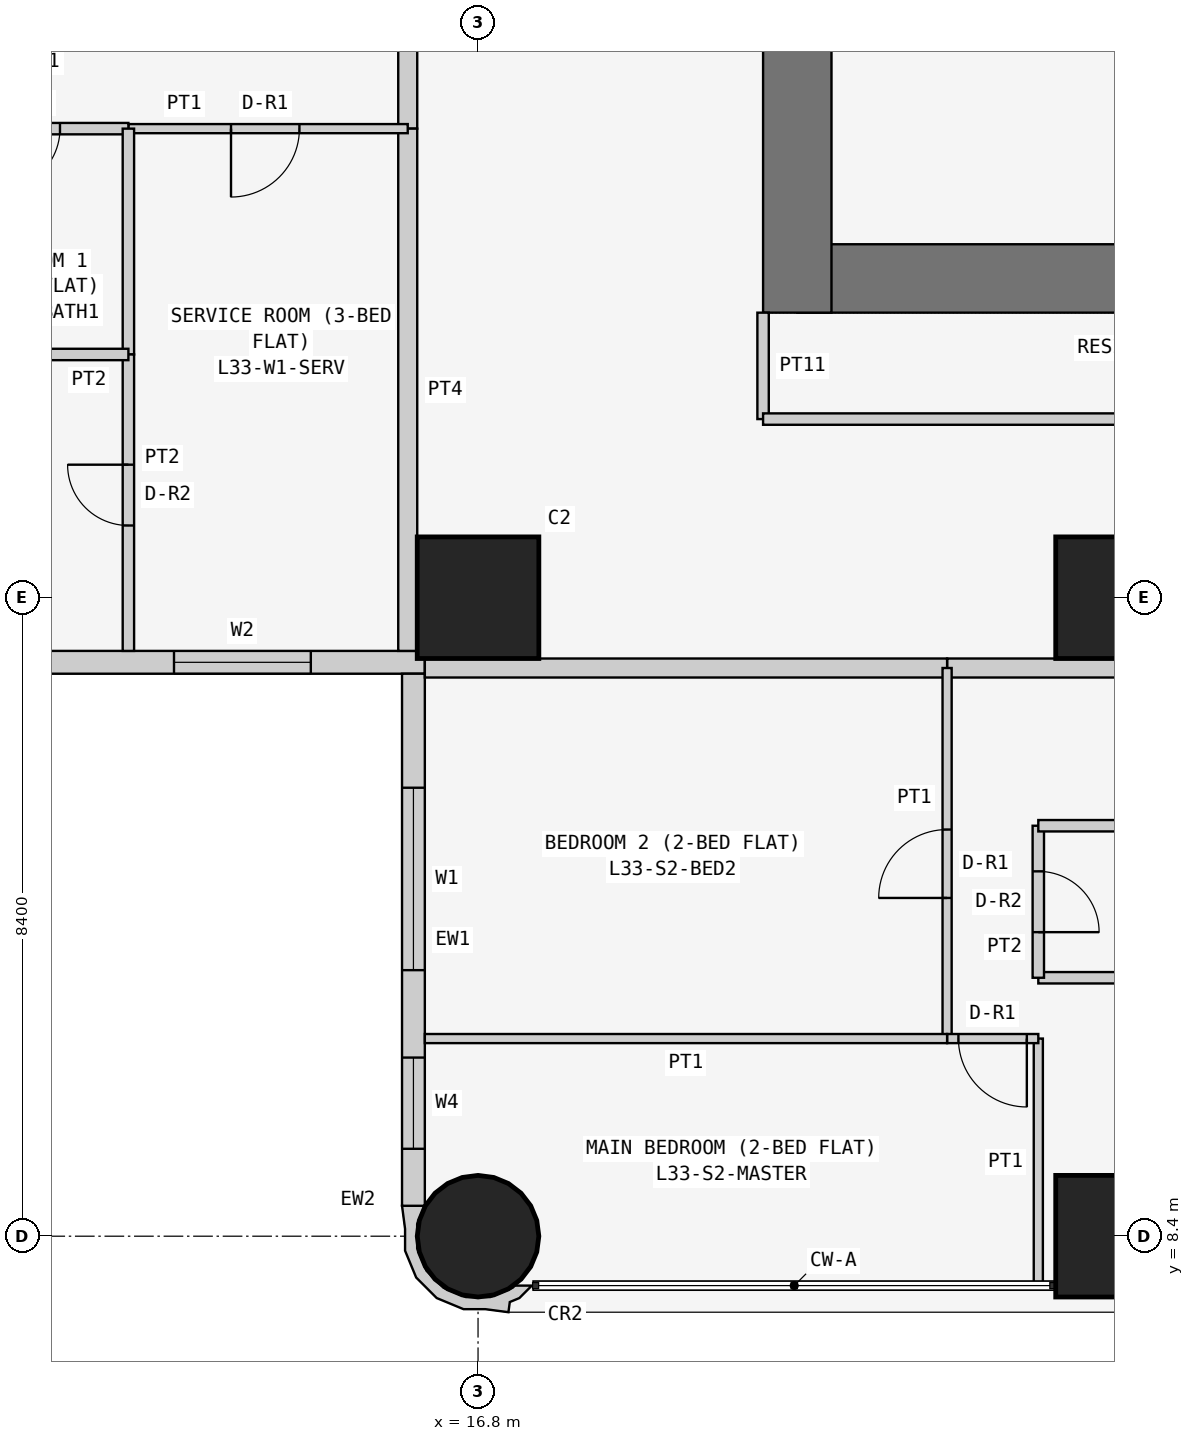
"""IFC4 building model, lengths in metres.
Left out: names, types, materials, properties, quantities, classifications, styles, units other than length and angle.
Written with IfcOpenShell. Run it as: python <this file> out.ifc"""

import sys

from ifc_helpers import new_model, si_unit, direction, frame, frame_2d, origin, origin_2d, place, context, subcontext, project, spatial, polyline, rectangle, circle, outline, extrude, element, fill, save


model = new_model("IFC4")
c1 = context("Model", 3, precision=1e-05, world=origin(), true_north=direction((0.0, 1.0)))
c2 = subcontext(c1, "Body", "Model", "MODEL_VIEW")
j1 = project(units=[si_unit("LENGTHUNIT", "METRE"), si_unit("PLANEANGLEUNIT", "RADIAN")], contexts=[c1])
p1 = place(None, origin())
s1 = spatial("IfcSite", under=j1, at=p1, CompositionType="ELEMENT")
p2 = place(p1, origin())
s2 = spatial("IfcBuilding", under=s1, at=p2, CompositionType="ELEMENT")
p3 = place(p2, frame((0.0, 0.0, 130.5)))
s3 = spatial("IfcBuildingStorey", under=s2, at=p3, CompositionType="ELEMENT", Elevation=130.5)
p4 = place(p3, frame((16.8, 8.4, 0.0), z_axis=(0.0, 0.0, 1.0), x_axis=(1.0, 0.0, 0.0)))
e1 = element("IfcColumn", 1, at=p4, inside=s3, PredefinedType="COLUMN", context=c2, shape_type="SweptSolid", body=[
    extrude(circle(Radius=0.8, at=origin_2d()), origin(), (0.0, 0.0, 1.0), 3.6),
])
for number, where, z_axis, x_axis in (
    (2, (16.8, 16.8, 0.0), (0.0, 0.0, 1.0), (1.0, 0.0, 0.0)),
    (3, (25.2, 8.4, 0.0), (0.0, 0.0, 1.0), (1.0, 0.0, 0.0)),
    (4, (25.2, 16.8, 0.0), (0.0, 0.0, 1.0), (1.0, 0.0, 0.0)),
):
    element("IfcColumn", number, at=place(p3, frame(where, z_axis=z_axis, x_axis=x_axis)), inside=s3, PredefinedType="COLUMN", context=c2, shape_type="SweptSolid", body=[
        extrude(rectangle(XDim=1.6, YDim=1.6, at=origin_2d()), origin(), (0.0, 0.0, 1.0), 3.6),
    ])
p5 = place(p3, frame((21.0, 21.0, 0.0), z_axis=(0.0, 0.0, 1.0), x_axis=(1.0, 0.0, 0.0)))
e5 = element("IfcWall", 5, at=p5, inside=s3, PredefinedType="SHEAR", context=c2, shape_type="SweptSolid", body=[
    extrude(rectangle(XDim=17.25, YDim=0.9, at=frame_2d((8.625, 0.0))), origin(), (0.0, 0.0, 1.0), 3.6),
])
p6 = place(p3, frame((21.0, 37.8, 0.0), z_axis=(0.0, 0.0, 1.0), x_axis=(0.0, -1.0, 0.0)))
e6 = element("IfcWall", 6, at=p6, inside=s3, PredefinedType="SHEAR", context=c2, shape_type="SweptSolid", body=[
    extrude(rectangle(XDim=17.25, YDim=0.9, at=frame_2d((8.625, 0.0))), origin(), (0.0, 0.0, 1.0), 3.6),
])
p7 = place(p6, frame((5.4, 0.0, 0.0)))
e7 = element("IfcOpeningElement", 7, at=p7, cuts=e6, PredefinedType="OPENING", context=c2, shape_type="SweptSolid", body=[
    extrude(rectangle(XDim=1.2, YDim=2.1, at=frame_2d((0.6, 1.05))), frame((0.0, 0.46, 0.0), z_axis=(0.0, -1.0, 0.0), x_axis=(1.0, 0.0, 0.0)), (0.0, 0.0, 1.0), 0.92),
])
p8 = place(p3, frame((0.4, 15.95, 0.0), z_axis=(0.0, 0.0, 1.0), x_axis=(1.0, 0.0, 0.0)))
e8 = element("IfcWall", 8, at=p8, inside=s3, PredefinedType="SOLIDWALL", context=c2, shape_type="SweptSolid", body=[
    extrude(rectangle(XDim=15.7, YDim=0.3, at=frame_2d((7.85, 0.0))), origin(), (0.0, 0.0, 1.0), 3.45),
])
p9 = place(p8, frame((12.4, 0.0, 0.9)))
e9 = element("IfcOpeningElement", 9, at=p9, cuts=e8, PredefinedType="OPENING", context=c2, shape_type="SweptSolid", body=[
    extrude(rectangle(XDim=1.8, YDim=1.5, at=frame_2d((0.9, 0.75))), frame((0.0, 0.16, 0.0), z_axis=(0.0, -1.0, 0.0), x_axis=(1.0, 0.0, 0.0)), (0.0, 0.0, 1.0), 0.32),
])
p10 = place(p8, frame((9.55, 0.0, 1.5)))
e10 = element("IfcOpeningElement", 10, at=p10, cuts=e8, PredefinedType="OPENING", context=c2, shape_type="SweptSolid", body=[
    extrude(rectangle(XDim=0.9, YDim=0.7, at=frame_2d((0.45, 0.35))), frame((0.0, 0.16, 0.0), z_axis=(0.0, -1.0, 0.0), x_axis=(1.0, 0.0, 0.0)), (0.0, 0.0, 1.0), 0.32),
])
p11 = place(p8, frame((5.1, 0.0, 0.9)))
e11 = element("IfcOpeningElement", 11, at=p11, cuts=e8, PredefinedType="OPENING", context=c2, shape_type="SweptSolid", body=[
    extrude(rectangle(XDim=1.8, YDim=1.5, at=frame_2d((0.9, 0.75))), frame((0.0, 0.16, 0.0), z_axis=(0.0, -1.0, 0.0), x_axis=(1.0, 0.0, 0.0)), (0.0, 0.0, 1.0), 0.32),
])
p12 = place(p8, frame((2.0, 0.0, 0.0)))
e12 = element("IfcOpeningElement", 12, at=p12, cuts=e8, PredefinedType="OPENING", context=c2, shape_type="SweptSolid", body=[
    extrude(rectangle(XDim=0.9, YDim=2.4, at=frame_2d((0.45, 1.2))), frame((0.0, 0.16, 0.0), z_axis=(0.0, -1.0, 0.0), x_axis=(1.0, 0.0, 0.0)), (0.0, 0.0, 1.0), 0.32),
])
p13 = place(p8, frame((0.7, 0.0, 0.9)))
e13 = element("IfcOpeningElement", 13, at=p13, cuts=e8, PredefinedType="OPENING", context=c2, shape_type="SweptSolid", body=[
    extrude(rectangle(XDim=1.2, YDim=1.5, at=frame_2d((0.6, 0.75))), frame((0.0, 0.16, 0.0), z_axis=(0.0, -1.0, 0.0), x_axis=(1.0, 0.0, 0.0)), (0.0, 0.0, 1.0), 0.32),
])
p14 = place(p3, frame((15.95, 15.8, 0.0), z_axis=(0.0, 0.0, 1.0), x_axis=(0.0, -1.0, 0.0)))
e14 = element("IfcWall", 14, at=p14, inside=s3, PredefinedType="SOLIDWALL", context=c2, shape_type="SweptSolid", body=[
    extrude(rectangle(XDim=7.0, YDim=0.3, at=frame_2d((3.5, 0.0))), origin(), (0.0, 0.0, 1.0), 3.45),
])
p15 = place(p14, frame((1.5, 0.0, 0.9)))
e15 = element("IfcOpeningElement", 15, at=p15, cuts=e14, PredefinedType="OPENING", context=c2, shape_type="SweptSolid", body=[
    extrude(rectangle(XDim=2.4, YDim=1.5, at=frame_2d((1.2, 0.75))), frame((0.0, 0.16, 0.0), z_axis=(0.0, -1.0, 0.0), x_axis=(1.0, 0.0, 0.0)), (0.0, 0.0, 1.0), 0.32),
])
p16 = place(p14, frame((5.05, 0.0, 0.9)))
e16 = element("IfcOpeningElement", 16, at=p16, cuts=e14, PredefinedType="OPENING", context=c2, shape_type="SweptSolid", body=[
    extrude(rectangle(XDim=1.2, YDim=1.5, at=frame_2d((0.6, 0.75))), frame((0.0, 0.16, 0.0), z_axis=(0.0, -1.0, 0.0), x_axis=(1.0, 0.0, 0.0)), (0.0, 0.0, 1.0), 0.32),
])
p17 = place(p3, frame((15.983, 8.727, 0.0), z_axis=(0.0, 0.0, 1.0), x_axis=(-0.343276641956, -0.93923434088, 0.0)))
e17 = element("IfcWall", 17, at=p17, inside=s3, PredefinedType="SOLIDWALL", context=c2, shape_type="SweptSolid", body=[
    extrude(outline(polyline([(0.829, 1.599), (0.697, 1.569), (0.604, 1.67), (0.394, 1.767), (0.471, 1.556), (0.509, 1.539), (0.724, 1.304), (0.833, 1.005), (0.82, 0.686), (0.686, 0.397), (0.451, 0.182), (0.152, 0.073), (-0.116, 0.084), (-0.127, 0.078), (-0.146, 0.071), (-0.006, -0.197), (0.266, -0.055), (0.535, 0.044), (0.817, 0.302), (0.978, 0.648), (0.994, 1.03), (0.895, 1.3), (0.829, 1.599)])), origin(), (0.0, 0.0, 1.0), 3.45),
])
p18 = place(p3, frame((20.55, 20.55, 0.0), z_axis=(0.0, 0.0, 1.0), x_axis=(0.0, -1.0, 0.0)))
e18 = element("IfcWall", 18, at=p18, inside=s3, PredefinedType="PARTITIONING", context=c2, shape_type="SweptSolid", body=[
    extrude(rectangle(XDim=1.4, YDim=0.15, at=frame_2d((0.7, 0.0))), origin(), (0.0, 0.0, 1.0), 3.45),
])
p19 = place(p3, frame((20.55, 19.15, 0.0), z_axis=(0.0, 0.0, 1.0), x_axis=(1.0, 0.0, 0.0)))
e19 = element("IfcWall", 19, at=p19, inside=s3, PredefinedType="PARTITIONING", context=c2, shape_type="SweptSolid", body=[
    extrude(rectangle(XDim=11.95, YDim=0.15, at=frame_2d((5.975, 0.0))), origin(), (0.0, 0.0, 1.0), 3.45),
])
p20 = place(p19, frame((8.35, 0.0, 0.0)))
e20 = element("IfcOpeningElement", 20, at=p20, cuts=e19, PredefinedType="OPENING", context=c2, shape_type="SweptSolid", body=[
    extrude(rectangle(XDim=1.0, YDim=2.1, at=frame_2d((0.5, 1.05))), frame((0.0, 0.085, 0.0), z_axis=(0.0, -1.0, 0.0), x_axis=(1.0, 0.0, 0.0)), (0.0, 0.0, 1.0), 0.17),
])
p21 = place(p3, frame((29.4, 15.875, 0.0), z_axis=(0.0, 0.0, 1.0), x_axis=(-1.0, 0.0, 0.0)))
e21 = element("IfcWall", 21, at=p21, inside=s3, PredefinedType="PARTITIONING", context=c2, shape_type="SweptSolid", body=[
    extrude(rectangle(XDim=6.429, YDim=0.25, at=frame_2d((3.214, 0.0))), origin(), (0.0, 0.0, 1.0), 3.45),
])
p22 = place(p21, frame((0.5, 0.0, 0.0)))
e22 = element("IfcOpeningElement", 22, at=p22, cuts=e21, PredefinedType="OPENING", context=c2, shape_type="SweptSolid", body=[
    extrude(rectangle(XDim=1.0, YDim=2.1, at=frame_2d((0.5, 1.05))), frame((0.0, 0.135, 0.0), z_axis=(0.0, -1.0, 0.0), x_axis=(1.0, 0.0, 0.0)), (0.0, 0.0, 1.0), 0.27),
])
p23 = place(p3, frame((22.971, 15.875, 0.0), z_axis=(0.0, 0.0, 1.0), x_axis=(-1.0, 0.0, 0.0)))
e23 = element("IfcWall", 23, at=p23, inside=s3, PredefinedType="PARTITIONING", context=c2, shape_type="SweptSolid", body=[
    extrude(rectangle(XDim=6.871, YDim=0.25, at=frame_2d((3.436, 0.0))), origin(), (0.0, 0.0, 1.0), 3.45),
])
p24 = place(p3, frame((15.875, 22.971, 0.0), z_axis=(0.0, 0.0, 1.0), x_axis=(0.0, 1.0, 0.0)))
e24 = element("IfcWall", 24, at=p24, inside=s3, PredefinedType="PARTITIONING", context=c2, shape_type="SweptSolid", body=[
    extrude(rectangle(XDim=1.2, YDim=0.25, at=frame_2d((0.6, 0.0))), origin(), (0.0, 0.0, 1.0), 3.45),
])
p25 = place(p3, frame((15.875, 16.1, 0.0), z_axis=(0.0, 0.0, 1.0), x_axis=(0.0, 1.0, 0.0)))
e25 = element("IfcWall", 25, at=p25, inside=s3, PredefinedType="PARTITIONING", context=c2, shape_type="SweptSolid", body=[
    extrude(rectangle(XDim=6.871, YDim=0.25, at=frame_2d((3.436, 0.0))), origin(), (0.0, 0.0, 1.0), 3.45),
])
p26 = place(p3, frame((29.4, 11.8, 0.0), z_axis=(0.0, 0.0, 1.0), x_axis=(-1.0, 0.0, 0.0)))
e26 = element("IfcWall", 26, at=p26, inside=s3, PredefinedType="PARTITIONING", context=c2, shape_type="SweptSolid", body=[
    extrude(rectangle(XDim=5.229, YDim=0.15, at=frame_2d((2.615, 0.0))), origin(), (0.0, 0.0, 1.0), 3.45),
])
p27 = place(p3, frame((24.171, 11.8, 0.0), z_axis=(0.0, 0.0, 1.0), x_axis=(0.0, 1.0, 0.0)))
e27 = element("IfcWall", 27, at=p27, inside=s3, PredefinedType="PARTITIONING", context=c2, shape_type="SweptSolid", body=[
    extrude(rectangle(XDim=2.0, YDim=0.15, at=frame_2d((1.0, 0.0))), origin(), (0.0, 0.0, 1.0), 3.45),
])
p28 = place(p27, frame((0.6, 0.0, 0.0)))
e28 = element("IfcOpeningElement", 28, at=p28, cuts=e27, PredefinedType="OPENING", context=c2, shape_type="SweptSolid", body=[
    extrude(rectangle(XDim=0.8, YDim=2.1, at=frame_2d((0.4, 1.05))), frame((0.0, 0.085, 0.0), z_axis=(0.0, -1.0, 0.0), x_axis=(1.0, 0.0, 0.0)), (0.0, 0.0, 1.0), 0.17),
])
p29 = place(p3, frame((24.171, 13.8, 0.0), z_axis=(0.0, 0.0, 1.0), x_axis=(1.0, 0.0, 0.0)))
e29 = element("IfcWall", 29, at=p29, inside=s3, PredefinedType="PARTITIONING", context=c2, shape_type="SweptSolid", body=[
    extrude(rectangle(XDim=5.229, YDim=0.15, at=frame_2d((2.615, 0.0))), origin(), (0.0, 0.0, 1.0), 3.45),
])
p30 = place(p3, frame((22.971, 11.0, 0.0), z_axis=(0.0, 0.0, 1.0), x_axis=(0.0, 1.0, 0.0)))
e30 = element("IfcWall", 30, at=p30, inside=s3, PredefinedType="PARTITIONING", context=c2, shape_type="SweptSolid", body=[
    extrude(rectangle(XDim=4.875, YDim=0.12, at=frame_2d((2.438, 0.0))), origin(), (0.0, 0.0, 1.0), 3.45),
])
p31 = place(p30, frame((1.85, 0.0, 0.0)))
e31 = element("IfcOpeningElement", 31, at=p31, cuts=e30, PredefinedType="OPENING", context=c2, shape_type="SweptSolid", body=[
    extrude(rectangle(XDim=0.9, YDim=2.1, at=frame_2d((0.45, 1.05))), frame((0.0, 0.07, 0.0), z_axis=(0.0, -1.0, 0.0), x_axis=(1.0, 0.0, 0.0)), (0.0, 0.0, 1.0), 0.14),
])
p32 = place(p3, frame((24.171, 7.75, 0.0), z_axis=(0.0, 0.0, 1.0), x_axis=(0.0, 1.0, 0.0)))
e32 = element("IfcWall", 32, at=p32, inside=s3, PredefinedType="PARTITIONING", context=c2, shape_type="SweptSolid", body=[
    extrude(rectangle(XDim=3.25, YDim=0.12, at=frame_2d((1.625, 0.0))), origin(), (0.0, 0.0, 1.0), 3.45),
])
p33 = place(p3, frame((24.171, 11.0, 0.0), z_axis=(0.0, 0.0, 1.0), x_axis=(-1.0, 0.0, 0.0)))
e33 = element("IfcWall", 33, at=p33, inside=s3, PredefinedType="PARTITIONING", context=c2, shape_type="SweptSolid", body=[
    extrude(rectangle(XDim=1.2, YDim=0.12, at=frame_2d((0.6, 0.0))), origin(), (0.0, 0.0, 1.0), 3.45),
])
p34 = place(p33, frame((0.151, 0.0, 0.0)))
e34 = element("IfcOpeningElement", 34, at=p34, cuts=e33, PredefinedType="OPENING", context=c2, shape_type="SweptSolid", body=[
    extrude(rectangle(XDim=0.9, YDim=2.1, at=frame_2d((0.45, 1.05))), frame((0.0, 0.07, 0.0), z_axis=(0.0, -1.0, 0.0), x_axis=(1.0, 0.0, 0.0)), (0.0, 0.0, 1.0), 0.14),
])
p35 = place(p3, frame((22.971, 11.0, 0.0), z_axis=(0.0, 0.0, 1.0), x_axis=(-1.0, 0.0, 0.0)))
e35 = element("IfcWall", 35, at=p35, inside=s3, PredefinedType="PARTITIONING", context=c2, shape_type="SweptSolid", body=[
    extrude(rectangle(XDim=6.871, YDim=0.12, at=frame_2d((3.436, 0.0))), origin(), (0.0, 0.0, 1.0), 3.45),
])
p36 = place(p3, frame((12.2, 22.971, 0.0), z_axis=(0.0, 0.0, 1.0), x_axis=(1.0, 0.0, 0.0)))
e36 = element("IfcWall", 36, at=p36, inside=s3, PredefinedType="PARTITIONING", context=c2, shape_type="SweptSolid", body=[
    extrude(rectangle(XDim=3.675, YDim=0.12, at=frame_2d((1.837, 0.0))), origin(), (0.0, 0.0, 1.0), 3.45),
])
p37 = place(p36, frame((1.35, 0.0, 0.0)))
e37 = element("IfcOpeningElement", 37, at=p37, cuts=e36, PredefinedType="OPENING", context=c2, shape_type="SweptSolid", body=[
    extrude(rectangle(XDim=0.9, YDim=2.1, at=frame_2d((0.45, 1.05))), frame((0.0, 0.07, 0.0), z_axis=(0.0, -1.0, 0.0), x_axis=(1.0, 0.0, 0.0)), (0.0, 0.0, 1.0), 0.14),
])
p38 = place(p3, frame((9.6, 22.971, 0.0), z_axis=(0.0, 0.0, 1.0), x_axis=(1.0, 0.0, 0.0)))
e38 = element("IfcWall", 38, at=p38, inside=s3, PredefinedType="PARTITIONING", context=c2, shape_type="SweptSolid", body=[
    extrude(rectangle(XDim=2.6, YDim=0.15, at=frame_2d((1.3, 0.0))), origin(), (0.0, 0.0, 1.0), 3.45),
])
p39 = place(p38, frame((0.9, 0.0, 0.0)))
e39 = element("IfcOpeningElement", 39, at=p39, cuts=e38, PredefinedType="OPENING", context=c2, shape_type="SweptSolid", body=[
    extrude(rectangle(XDim=0.8, YDim=2.1, at=frame_2d((0.4, 1.05))), frame((0.0, 0.085, 0.0), z_axis=(0.0, -1.0, 0.0), x_axis=(1.0, 0.0, 0.0)), (0.0, 0.0, 1.0), 0.17),
])
p40 = place(p3, frame((12.2, 22.971, 0.0), z_axis=(0.0, 0.0, 1.0), x_axis=(0.0, -1.0, 0.0)))
e40 = element("IfcWall", 40, at=p40, inside=s3, PredefinedType="PARTITIONING", context=c2, shape_type="SweptSolid", body=[
    extrude(rectangle(XDim=2.971, YDim=0.15, at=frame_2d((1.485, 0.0))), origin(), (0.0, 0.0, 1.0), 3.45),
])
p41 = place(p3, frame((12.2, 20.0, 0.0), z_axis=(0.0, 0.0, 1.0), x_axis=(0.0, -1.0, 0.0)))
e41 = element("IfcWall", 41, at=p41, inside=s3, PredefinedType="PARTITIONING", context=c2, shape_type="SweptSolid", body=[
    extrude(rectangle(XDim=3.9, YDim=0.15, at=frame_2d((1.95, 0.0))), origin(), (0.0, 0.0, 1.0), 3.45),
])
p42 = place(p41, frame((1.45, 0.0, 0.0)))
e42 = element("IfcOpeningElement", 42, at=p42, cuts=e41, PredefinedType="OPENING", context=c2, shape_type="SweptSolid", body=[
    extrude(rectangle(XDim=0.8, YDim=2.1, at=frame_2d((0.4, 1.05))), frame((0.0, 0.085, 0.0), z_axis=(0.0, -1.0, 0.0), x_axis=(1.0, 0.0, 0.0)), (0.0, 0.0, 1.0), 0.17),
])
p43 = place(p3, frame((9.6, 20.0, 0.0), z_axis=(0.0, 0.0, 1.0), x_axis=(1.0, 0.0, 0.0)))
e43 = element("IfcWall", 43, at=p43, inside=s3, PredefinedType="PARTITIONING", context=c2, shape_type="SweptSolid", body=[
    extrude(rectangle(XDim=2.6, YDim=0.15, at=frame_2d((1.3, 0.0))), origin(), (0.0, 0.0, 1.0), 3.45),
])
p44 = place(p15, origin())
e44 = element("IfcWindow", 44, at=p44, inside=s3, PartitioningType="SINGLE_PANEL", PredefinedType="WINDOW", context=c2, shape_type="SweptSolid", body=[
    extrude(rectangle(XDim=2.4, YDim=1.5, at=frame_2d((1.2, 0.75))), frame((0.0, 0.03, 0.0), z_axis=(0.0, -1.0, 0.0), x_axis=(1.0, 0.0, 0.0)), (0.0, 0.0, 1.0), 0.06),
])
fill(e15, e44)
p45 = place(p16, origin())
e45 = element("IfcWindow", 45, at=p45, inside=s3, PartitioningType="SINGLE_PANEL", PredefinedType="WINDOW", context=c2, shape_type="SweptSolid", body=[
    extrude(rectangle(XDim=1.2, YDim=1.5, at=frame_2d((0.6, 0.75))), frame((0.0, 0.03, 0.0), z_axis=(0.0, -1.0, 0.0), x_axis=(1.0, 0.0, 0.0)), (0.0, 0.0, 1.0), 0.06),
])
fill(e16, e45)
p46 = place(p9, origin())
e46 = element("IfcWindow", 46, at=p46, inside=s3, PartitioningType="SINGLE_PANEL", PredefinedType="WINDOW", context=c2, shape_type="SweptSolid", body=[
    extrude(rectangle(XDim=1.8, YDim=1.5, at=frame_2d((0.9, 0.75))), frame((0.0, 0.03, 0.0), z_axis=(0.0, -1.0, 0.0), x_axis=(1.0, 0.0, 0.0)), (0.0, 0.0, 1.0), 0.06),
])
fill(e9, e46)
p47 = place(p28, frame((0.8, 0.0, 0.0), z_axis=(0.0, 0.0, 1.0), x_axis=(-1.0, 0.0, 0.0)))
e47 = element("IfcDoor", 47, at=p47, inside=s3, OperationType="SINGLE_SWING_RIGHT", PredefinedType="DOOR", context=c2, shape_type="SweptSolid", body=[
    extrude(rectangle(XDim=0.8, YDim=2.1, at=frame_2d((0.4, 1.05))), frame((0.0, 0.025, 0.0), z_axis=(0.0, -1.0, 0.0), x_axis=(1.0, 0.0, 0.0)), (0.0, 0.0, 1.0), 0.05),
])
fill(e28, e47)
p48 = place(p31, origin())
e48 = element("IfcDoor", 48, at=p48, inside=s3, OperationType="SINGLE_SWING_LEFT", PredefinedType="DOOR", context=c2, shape_type="SweptSolid", body=[
    extrude(rectangle(XDim=0.9, YDim=2.1, at=frame_2d((0.45, 1.05))), frame((0.0, 0.025, 0.0), z_axis=(0.0, -1.0, 0.0), x_axis=(1.0, 0.0, 0.0)), (0.0, 0.0, 1.0), 0.05),
])
fill(e31, e48)
p49 = place(p34, origin())
e49 = element("IfcDoor", 49, at=p49, inside=s3, OperationType="SINGLE_SWING_LEFT", PredefinedType="DOOR", context=c2, shape_type="SweptSolid", body=[
    extrude(rectangle(XDim=0.9, YDim=2.1, at=frame_2d((0.45, 1.05))), frame((0.0, 0.025, 0.0), z_axis=(0.0, -1.0, 0.0), x_axis=(1.0, 0.0, 0.0)), (0.0, 0.0, 1.0), 0.05),
])
fill(e34, e49)
p50 = place(p37, frame((0.9, 0.0, 0.0), z_axis=(0.0, 0.0, 1.0), x_axis=(-1.0, 0.0, 0.0)))
e50 = element("IfcDoor", 50, at=p50, inside=s3, OperationType="SINGLE_SWING_RIGHT", PredefinedType="DOOR", context=c2, shape_type="SweptSolid", body=[
    extrude(rectangle(XDim=0.9, YDim=2.1, at=frame_2d((0.45, 1.05))), frame((0.0, 0.025, 0.0), z_axis=(0.0, -1.0, 0.0), x_axis=(1.0, 0.0, 0.0)), (0.0, 0.0, 1.0), 0.05),
])
fill(e37, e50)
p51 = place(p42, frame((0.8, 0.0, 0.0), z_axis=(0.0, 0.0, 1.0), x_axis=(-1.0, 0.0, 0.0)))
e51 = element("IfcDoor", 51, at=p51, inside=s3, OperationType="SINGLE_SWING_RIGHT", PredefinedType="DOOR", context=c2, shape_type="SweptSolid", body=[
    extrude(rectangle(XDim=0.8, YDim=2.1, at=frame_2d((0.4, 1.05))), frame((0.0, 0.025, 0.0), z_axis=(0.0, -1.0, 0.0), x_axis=(1.0, 0.0, 0.0)), (0.0, 0.0, 1.0), 0.05),
])
fill(e42, e51)
p52 = place(p39, frame((0.8, 0.0, 0.0), z_axis=(0.0, 0.0, 1.0), x_axis=(-1.0, 0.0, 0.0)))
e52 = element("IfcDoor", 52, at=p52, inside=s3, OperationType="SINGLE_SWING_RIGHT", PredefinedType="DOOR", context=c2, shape_type="SweptSolid", body=[
    extrude(rectangle(XDim=0.8, YDim=2.1, at=frame_2d((0.4, 1.05))), frame((0.0, 0.025, 0.0), z_axis=(0.0, -1.0, 0.0), x_axis=(1.0, 0.0, 0.0)), (0.0, 0.0, 1.0), 0.05),
])
fill(e39, e52)
save(model, sys.argv[1])
